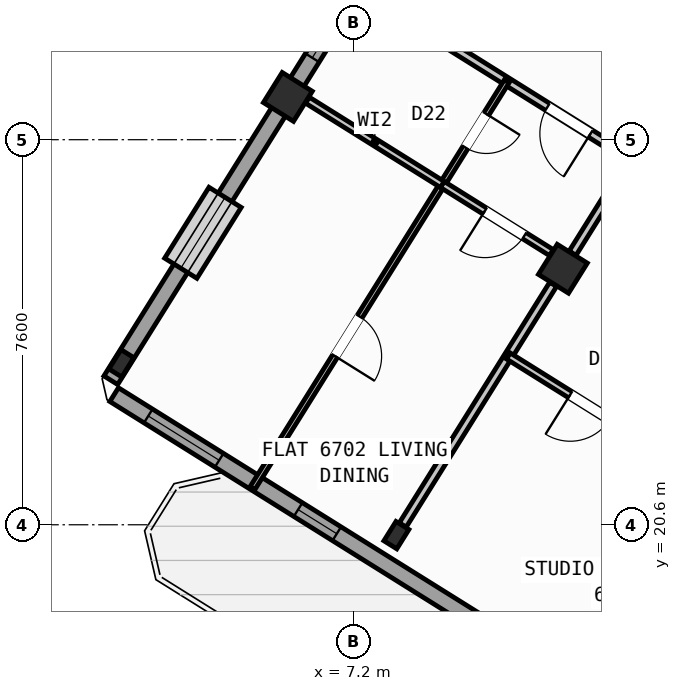
"""IFC4 building model, lengths in metres.
Left out: names, types, materials, properties, quantities, classifications, styles, units other than length and angle.
Written with IfcOpenShell. Run it as: python <this file> out.ifc"""

import sys

from ifc_helpers import new_model, si_unit, direction, frame, frame_2d, origin, origin_2d, place, context, subcontext, project, spatial, rectangle, hollow_rectangle, i_section, extrude, source, transform, mapped, element, fill, save


model = new_model("IFC4")
c1 = context("Model", 3, precision=1e-05, world=origin(), true_north=direction((0.0, 1.0)))
c2 = subcontext(c1, "Body", "Model", "MODEL_VIEW")
j1 = project(units=[si_unit("LENGTHUNIT", "METRE"), si_unit("PLANEANGLEUNIT", "RADIAN")], contexts=[c1])
p1 = place(None, origin())
s1 = spatial("IfcSite", under=j1, at=p1, CompositionType="ELEMENT")
p2 = place(p1, origin())
s2 = spatial("IfcBuilding", under=s1, at=p2, CompositionType="ELEMENT")
p3 = place(p2, frame((0.0, 0.0, 266.4)))
s3 = spatial("IfcBuildingStorey", under=s2, at=p3, CompositionType="ELEMENT", Elevation=266.4)
m1 = source(origin(), c2, "Body", "SweptSolid", [
    extrude(hollow_rectangle(XDim=0.7, YDim=0.7, WallThickness=0.028, at=origin_2d()), origin(), (0.0, 0.0, 1.0), 3.6),
])
p4 = place(p3, frame((11.336, 25.653, 0.0), z_axis=(0.0, 0.0, 1.0), x_axis=(-0.848048096156, 0.529919264233, 0.0)))
e1 = element("IfcColumn", 1, at=p4, inside=s3, PredefinedType="COLUMN", context=c2, shape_type="MappedRepresentation", body=[
    mapped(m1, transform((0.0, 0.0, 0.0), scale=1.0)),
])
m2 = source(origin(), c2, "Body", "SweptSolid", [
    extrude(i_section(OverallWidth=0.3, OverallDepth=0.45, WebThickness=0.014, FlangeThickness=0.026, at=origin_2d()), origin(), (0.0, 0.0, 1.0), 3.6),
])
p5 = place(p3, frame((8.051, 20.395, 0.0), z_axis=(0.0, 0.0, 1.0), x_axis=(-0.848048096156, 0.529919264233, 0.0)))
e2 = element("IfcColumn", 2, at=p5, inside=s3, PredefinedType="COLUMN", context=c2, shape_type="MappedRepresentation", body=[
    mapped(m2, transform((0.0, 0.0, 0.0), scale=1.0)),
])
p6 = place(p3, frame((5.909, 29.044, 0.0), z_axis=(0.0, 0.0, 1.0), x_axis=(-0.848048096156, 0.529919264233, 0.0)))
e3 = element("IfcColumn", 3, at=p6, inside=s3, PredefinedType="COLUMN", context=c2, shape_type="MappedRepresentation", body=[
    mapped(m1, transform((0.0, 0.0, 0.0), scale=1.0)),
])
p7 = place(p3, frame((2.623, 23.786, 0.0), z_axis=(0.0, 0.0, 1.0), x_axis=(-0.848048096156, 0.529919264233, 0.0)))
e4 = element("IfcColumn", 4, at=p7, inside=s3, PredefinedType="COLUMN", context=c2, shape_type="MappedRepresentation", body=[
    mapped(m2, transform((0.0, 0.0, 0.0), scale=1.0)),
])
p8 = place(p3, frame((29.268, 6.429, 0.0), z_axis=(0.0, 0.0, 1.0), x_axis=(-0.848049971435, 0.529916263149, 0.0)))
e5 = element("IfcWall", 5, at=p8, inside=s3, PredefinedType="STANDARD", context=c2, shape_type="SweptSolid", body=[
    extrude(rectangle(XDim=31.588, YDim=0.32, at=frame_2d((15.794, 0.0))), origin(), (0.0, 0.0, 1.0), 3.35),
])
p9 = place(p8, frame((16.362, 0.0, 0.0)))
e6 = element("IfcOpeningElement", 6, at=p9, cuts=e5, PredefinedType="OPENING", context=c2, shape_type="SweptSolid", body=[
    extrude(rectangle(XDim=1.2, YDim=2.15, at=frame_2d((0.6, 1.075))), frame((0.0, 0.17, 0.0), z_axis=(0.0, -1.0, 0.0), x_axis=(1.0, 0.0, 0.0)), (0.0, 0.0, 1.0), 0.34),
])
p10 = place(p8, frame((3.859, 0.0, 0.9)))
e7 = element("IfcOpeningElement", 7, at=p10, cuts=e5, PredefinedType="OPENING", context=c2, shape_type="SweptSolid", body=[
    extrude(rectangle(XDim=1.65, YDim=1.45, at=frame_2d((0.825, 0.725))), frame((0.0, 0.17, 0.0), z_axis=(0.0, -1.0, 0.0), x_axis=(1.0, 0.0, 0.0)), (0.0, 0.0, 1.0), 0.34),
])
p11 = place(p8, frame((10.519, 0.0, 0.9)))
e8 = element("IfcOpeningElement", 8, at=p11, cuts=e5, PredefinedType="OPENING", context=c2, shape_type="SweptSolid", body=[
    extrude(rectangle(XDim=1.65, YDim=1.45, at=frame_2d((0.825, 0.725))), frame((0.0, 0.17, 0.0), z_axis=(0.0, -1.0, 0.0), x_axis=(1.0, 0.0, 0.0)), (0.0, 0.0, 1.0), 0.34),
])
p12 = place(p8, frame((21.219, 0.0, 0.95)))
e9 = element("IfcOpeningElement", 9, at=p12, cuts=e5, PredefinedType="OPENING", context=c2, shape_type="SweptSolid", body=[
    extrude(rectangle(XDim=1.95, YDim=1.35, at=frame_2d((0.975, 0.675))), frame((0.0, 0.17, 0.0), z_axis=(0.0, -1.0, 0.0), x_axis=(1.0, 0.0, 0.0)), (0.0, 0.0, 1.0), 0.34),
])
p13 = place(p8, frame((26.406, 0.0, 1.0)))
e10 = element("IfcOpeningElement", 10, at=p13, cuts=e5, PredefinedType="OPENING", context=c2, shape_type="SweptSolid", body=[
    extrude(rectangle(XDim=0.9, YDim=1.25, at=frame_2d((0.45, 0.625))), frame((0.0, 0.17, 0.0), z_axis=(0.0, -1.0, 0.0), x_axis=(1.0, 0.0, 0.0)), (0.0, 0.0, 1.0), 0.34),
])
p14 = place(p8, frame((29.143, 0.0, 0.9)))
e11 = element("IfcOpeningElement", 11, at=p14, cuts=e5, PredefinedType="OPENING", context=c2, shape_type="SweptSolid", body=[
    extrude(rectangle(XDim=1.65, YDim=1.45, at=frame_2d((0.825, 0.725))), frame((0.0, 0.17, 0.0), z_axis=(0.0, -1.0, 0.0), x_axis=(1.0, 0.0, 0.0)), (0.0, 0.0, 1.0), 0.34),
])
p15 = place(p3, frame((2.415, 23.452, 0.0), z_axis=(0.0, 0.0, 1.0), x_axis=(0.52991049553, 0.848053575387, 0.0)))
e12 = element("IfcWall", 12, at=p15, inside=s3, PredefinedType="STANDARD", context=c2, shape_type="SweptSolid", body=[
    extrude(rectangle(XDim=21.587, YDim=0.32, at=frame_2d((10.794, 0.0))), origin(), (0.0, 0.0, 1.0), 2.875),
])
p16 = place(p15, frame((2.606, 0.0, 0.9)))
e13 = element("IfcOpeningElement", 13, at=p16, cuts=e12, PredefinedType="OPENING", context=c2, shape_type="SweptSolid", body=[
    extrude(rectangle(XDim=1.65, YDim=1.45, at=frame_2d((0.825, 0.725))), frame((0.0, 0.17, 0.0), z_axis=(0.0, -1.0, 0.0), x_axis=(1.0, 0.0, 0.0)), (0.0, 0.0, 1.0), 0.34),
])
p17 = place(p15, frame((7.504, 0.0, 1.0)))
e14 = element("IfcOpeningElement", 14, at=p17, cuts=e12, PredefinedType="OPENING", context=c2, shape_type="SweptSolid", body=[
    extrude(rectangle(XDim=0.9, YDim=1.25, at=frame_2d((0.45, 0.625))), frame((0.0, 0.17, 0.0), z_axis=(0.0, -1.0, 0.0), x_axis=(1.0, 0.0, 0.0)), (0.0, 0.0, 1.0), 0.34),
])
p18 = place(p15, frame((12.084, 0.0, 1.0)))
e15 = element("IfcOpeningElement", 15, at=p18, cuts=e12, PredefinedType="OPENING", context=c2, shape_type="SweptSolid", body=[
    extrude(rectangle(XDim=0.9, YDim=1.25, at=frame_2d((0.45, 0.625))), frame((0.0, 0.17, 0.0), z_axis=(0.0, -1.0, 0.0), x_axis=(1.0, 0.0, 0.0)), (0.0, 0.0, 1.0), 0.34),
])
p19 = place(p15, frame((15.619, 0.0, 1.0)))
e16 = element("IfcOpeningElement", 16, at=p19, cuts=e12, PredefinedType="OPENING", context=c2, shape_type="SweptSolid", body=[
    extrude(rectangle(XDim=0.9, YDim=1.25, at=frame_2d((0.45, 0.625))), frame((0.0, 0.17, 0.0), z_axis=(0.0, -1.0, 0.0), x_axis=(1.0, 0.0, 0.0)), (0.0, 0.0, 1.0), 0.34),
])
p20 = place(p15, frame((18.569, 0.0, 1.0)))
e17 = element("IfcOpeningElement", 17, at=p20, cuts=e12, PredefinedType="OPENING", context=c2, shape_type="SweptSolid", body=[
    extrude(rectangle(XDim=0.9, YDim=1.25, at=frame_2d((0.45, 0.625))), frame((0.0, 0.17, 0.0), z_axis=(0.0, -1.0, 0.0), x_axis=(1.0, 0.0, 0.0)), (0.0, 0.0, 1.0), 0.34),
])
p21 = place(p3, frame((22.495, 24.281, 0.0), z_axis=(0.0, 0.0, 1.0), x_axis=(-0.848052408131, 0.529912363569, 0.0)))
e18 = element("IfcWall", 18, at=p21, inside=s3, PredefinedType="PARTITIONING", context=c2, shape_type="SweptSolid", body=[
    extrude(rectangle(XDim=16.73, YDim=0.16, at=frame_2d((8.365, 0.0))), origin(), (0.0, 0.0, 1.0), 3.34),
])
p22 = place(p21, frame((2.22, 0.0, 0.0)))
e19 = element("IfcOpeningElement", 19, at=p22, cuts=e18, PredefinedType="OPENING", context=c2, shape_type="SweptSolid", body=[
    extrude(rectangle(XDim=0.86, YDim=2.05, at=frame_2d((0.43, 1.025))), frame((0.0, 0.09, 0.0), z_axis=(0.0, -1.0, 0.0), x_axis=(1.0, 0.0, 0.0)), (0.0, 0.0, 1.0), 0.18),
])
p23 = place(p21, frame((6.49, 0.0, 0.0)))
e20 = element("IfcOpeningElement", 20, at=p23, cuts=e18, PredefinedType="OPENING", context=c2, shape_type="SweptSolid", body=[
    extrude(rectangle(XDim=1.0, YDim=2.1, at=frame_2d((0.5, 1.05))), frame((0.0, 0.09, 0.0), z_axis=(0.0, -1.0, 0.0), x_axis=(1.0, 0.0, 0.0)), (0.0, 0.0, 1.0), 0.18),
])
p24 = place(p21, frame((14.76, 0.0, 0.0)))
e21 = element("IfcOpeningElement", 21, at=p24, cuts=e18, PredefinedType="OPENING", context=c2, shape_type="SweptSolid", body=[
    extrude(rectangle(XDim=1.0, YDim=2.1, at=frame_2d((0.5, 1.05))), frame((0.0, 0.09, 0.0), z_axis=(0.0, -1.0, 0.0), x_axis=(1.0, 0.0, 0.0)), (0.0, 0.0, 1.0), 0.18),
])
p25 = place(p3, frame((21.329, 22.416, 0.0), z_axis=(0.0, 0.0, 1.0), x_axis=(-0.848052408131, 0.529912363569, 0.0)))
e22 = element("IfcWall", 22, at=p25, inside=s3, PredefinedType="PARTITIONING", context=c2, shape_type="SweptSolid", body=[
    extrude(rectangle(XDim=16.73, YDim=0.16, at=frame_2d((8.365, 0.0))), origin(), (0.0, 0.0, 1.0), 3.34),
])
p26 = place(p25, frame((1.395, 0.0, 0.0)))
e23 = element("IfcOpeningElement", 23, at=p26, cuts=e22, PredefinedType="OPENING", context=c2, shape_type="SweptSolid", body=[
    extrude(rectangle(XDim=1.0, YDim=2.1, at=frame_2d((0.5, 1.05))), frame((0.0, 0.09, 0.0), z_axis=(0.0, -1.0, 0.0), x_axis=(1.0, 0.0, 0.0)), (0.0, 0.0, 1.0), 0.18),
])
p27 = place(p25, frame((7.82, 0.0, 0.0)))
e24 = element("IfcOpeningElement", 24, at=p27, cuts=e22, PredefinedType="OPENING", context=c2, shape_type="SweptSolid", body=[
    extrude(rectangle(XDim=1.0, YDim=2.1, at=frame_2d((0.5, 1.05))), frame((0.0, 0.09, 0.0), z_axis=(0.0, -1.0, 0.0), x_axis=(1.0, 0.0, 0.0)), (0.0, 0.0, 1.0), 0.18),
])
p28 = place(p25, frame((11.14, 0.0, 0.0)))
e25 = element("IfcOpeningElement", 25, at=p28, cuts=e22, PredefinedType="OPENING", context=c2, shape_type="SweptSolid", body=[
    extrude(rectangle(XDim=1.0, YDim=2.1, at=frame_2d((0.5, 1.05))), frame((0.0, 0.09, 0.0), z_axis=(0.0, -1.0, 0.0), x_axis=(1.0, 0.0, 0.0)), (0.0, 0.0, 1.0), 0.18),
])
p29 = place(p3, frame((12.688, 27.815, 0.0), z_axis=(0.0, 0.0, 1.0), x_axis=(-0.52994879608, -0.848029641896, 0.0)))
e26 = element("IfcWall", 26, at=p29, inside=s3, PredefinedType="PARTITIONING", context=c2, shape_type="SweptSolid", body=[
    extrude(rectangle(XDim=2.188, YDim=0.16, at=frame_2d((1.094, 0.0))), origin(), (0.0, 0.0, 1.0), 2.875),
])
p30 = place(p3, frame((11.144, 25.346, 0.0), z_axis=(0.0, 0.0, 1.0), x_axis=(-0.529904903214, -0.848057069748, 0.0)))
e27 = element("IfcWall", 27, at=p30, inside=s3, PredefinedType="PARTITIONING", context=c2, shape_type="SweptSolid", body=[
    extrude(rectangle(XDim=5.601, YDim=0.16, at=frame_2d((2.801, 0.0))), origin(), (0.0, 0.0, 1.0), 2.875),
])
p31 = place(p3, frame((15.688, 20.54, 0.0), z_axis=(0.0, 0.0, 1.0), x_axis=(-0.848049732085, 0.529916646191, 0.0)))
e28 = element("IfcWall", 28, at=p31, inside=s3, PredefinedType="PLUMBINGWALL", context=c2, shape_type="SweptSolid", body=[
    extrude(rectangle(XDim=6.4, YDim=0.14, at=frame_2d((3.2, 0.0))), origin(), (0.0, 0.0, 1.0), 3.34),
])
p32 = place(p31, frame((4.04, 0.0, 0.0)))
e29 = element("IfcOpeningElement", 29, at=p32, cuts=e28, PredefinedType="OPENING", context=c2, shape_type="SweptSolid", body=[
    extrude(rectangle(XDim=0.92, YDim=2.08, at=frame_2d((0.46, 1.04))), frame((0.0, 0.08, 0.0), z_axis=(0.0, -1.0, 0.0), x_axis=(1.0, 0.0, 0.0)), (0.0, 0.0, 1.0), 0.16),
])
p33 = place(p3, frame((10.228, 29.352, 0.0), z_axis=(0.0, 0.0, 1.0), x_axis=(-0.529917830441, -0.848048992088, 0.0)))
e30 = element("IfcWall", 30, at=p33, inside=s3, PredefinedType="PARTITIONING", context=c2, shape_type="SweptSolid", body=[
    extrude(rectangle(XDim=9.47, YDim=0.11, at=frame_2d((4.735, 0.0))), origin(), (0.0, 0.0, 1.0), 3.34),
])
p34 = place(p33, frame((0.76, 0.0, 0.0)))
e31 = element("IfcOpeningElement", 31, at=p34, cuts=e30, PredefinedType="OPENING", context=c2, shape_type="SweptSolid", body=[
    extrude(rectangle(XDim=0.78, YDim=2.05, at=frame_2d((0.39, 1.025))), frame((0.0, 0.065, 0.0), z_axis=(0.0, -1.0, 0.0), x_axis=(1.0, 0.0, 0.0)), (0.0, 0.0, 1.0), 0.13),
])
p35 = place(p33, frame((5.475, 0.0, 0.0)))
e32 = element("IfcOpeningElement", 32, at=p35, cuts=e30, PredefinedType="OPENING", context=c2, shape_type="SweptSolid", body=[
    extrude(rectangle(XDim=0.92, YDim=2.08, at=frame_2d((0.46, 1.04))), frame((0.0, 0.065, 0.0), z_axis=(0.0, -1.0, 0.0), x_axis=(1.0, 0.0, 0.0)), (0.0, 0.0, 1.0), 0.13),
])
p36 = place(p3, frame((11.109, 25.972, 0.0), z_axis=(0.0, 0.0, 1.0), x_axis=(-0.848041534199, 0.529929765415, 0.0)))
e33 = element("IfcWall", 33, at=p36, inside=s3, PredefinedType="PLUMBINGWALL", context=c2, shape_type="SweptSolid", body=[
    extrude(rectangle(XDim=2.538, YDim=0.14, at=frame_2d((1.269, 0.0))), origin(), (0.0, 0.0, 1.0), 2.875),
])
p37 = place(p36, frame((0.628, 0.0, 0.0)))
e34 = element("IfcOpeningElement", 34, at=p37, cuts=e33, PredefinedType="OPENING", context=c2, shape_type="SweptSolid", body=[
    extrude(rectangle(XDim=0.92, YDim=2.08, at=frame_2d((0.46, 1.04))), frame((0.0, 0.08, 0.0), z_axis=(0.0, -1.0, 0.0), x_axis=(1.0, 0.0, 0.0)), (0.0, 0.0, 1.0), 0.16),
])
p38 = place(p3, frame((8.956, 27.317, 0.0), z_axis=(0.0, 0.0, 1.0), x_axis=(-0.848050751193, 0.529915015264, 0.0)))
e35 = element("IfcWall", 35, at=p38, inside=s3, PredefinedType="PLUMBINGWALL", context=c2, shape_type="SweptSolid", body=[
    extrude(rectangle(XDim=3.138, YDim=0.14, at=frame_2d((1.569, 0.0))), origin(), (0.0, 0.0, 1.0), 2.875),
])
m3 = source(origin(), c2, "Body", "SweptSolid", [
    extrude(rectangle(XDim=0.9, YDim=1.25, at=frame_2d((0.45, 0.625))), frame((0.0, 0.03, 0.0), z_axis=(0.0, -1.0, 0.0), x_axis=(1.0, 0.0, 0.0)), (0.0, 0.0, 1.0), 0.06),
])
p39 = place(p13, origin())
e36 = element("IfcWindow", 36, at=p39, inside=s3, PartitioningType="SINGLE_PANEL", PredefinedType="WINDOW", context=c2, shape_type="MappedRepresentation", body=[
    mapped(m3, transform((0.0, 0.0, 0.0), scale=1.0)),
])
fill(e10, e36)
m4 = source(origin(), c2, "Body", "SweptSolid", [
    extrude(rectangle(XDim=1.65, YDim=1.45, at=frame_2d((0.825, 0.725))), frame((0.0, 0.03, 0.0), z_axis=(0.0, -1.0, 0.0), x_axis=(1.0, 0.0, 0.0)), (0.0, 0.0, 1.0), 0.06),
])
p40 = place(p14, origin())
e37 = element("IfcWindow", 37, at=p40, inside=s3, PartitioningType="SINGLE_PANEL", PredefinedType="WINDOW", context=c2, shape_type="MappedRepresentation", body=[
    mapped(m4, transform((0.0, 0.0, 0.0), scale=1.0)),
])
fill(e11, e37)
p41 = place(p16, origin())
e38 = element("IfcWindow", 38, at=p41, inside=s3, PartitioningType="SINGLE_PANEL", PredefinedType="WINDOW", context=c2, shape_type="MappedRepresentation", body=[
    mapped(m4, transform((0.0, 0.0, 0.0), scale=1.0)),
])
fill(e13, e38)
p42 = place(p17, origin())
e39 = element("IfcWindow", 39, at=p42, inside=s3, PartitioningType="SINGLE_PANEL", PredefinedType="WINDOW", context=c2, shape_type="MappedRepresentation", body=[
    mapped(m3, transform((0.0, 0.0, 0.0), scale=1.0)),
])
fill(e14, e39)
m5 = source(origin(), c2, "Body", "SweptSolid", [
    extrude(rectangle(XDim=0.92, YDim=2.08, at=frame_2d((0.46, 1.04))), frame((0.0, 0.025, 0.0), z_axis=(0.0, -1.0, 0.0), x_axis=(1.0, 0.0, 0.0)), (0.0, 0.0, 1.0), 0.05),
])
p43 = place(p32, origin())
e40 = element("IfcDoor", 40, at=p43, inside=s3, OperationType="SINGLE_SWING_RIGHT", PredefinedType="DOOR", context=c2, shape_type="MappedRepresentation", body=[
    mapped(m5, transform((0.0, 0.0, 0.0), scale=1.0)),
])
fill(e29, e40)
m6 = source(origin(), c2, "Body", "SweptSolid", [
    extrude(rectangle(XDim=1.0, YDim=2.1, at=frame_2d((0.5, 1.05))), frame((0.0, 0.025, 0.0), z_axis=(0.0, -1.0, 0.0), x_axis=(1.0, 0.0, 0.0)), (0.0, 0.0, 1.0), 0.05),
])
p44 = place(p28, origin())
e41 = element("IfcDoor", 41, at=p44, inside=s3, OperationType="SINGLE_SWING_LEFT", PredefinedType="DOOR", context=c2, shape_type="MappedRepresentation", body=[
    mapped(m6, transform((0.0, 0.0, 0.0), scale=1.0)),
])
fill(e25, e41)
p45 = place(p37, origin())
e42 = element("IfcDoor", 42, at=p45, inside=s3, OperationType="SINGLE_SWING_RIGHT", PredefinedType="DOOR", context=c2, shape_type="MappedRepresentation", body=[
    mapped(m5, transform((0.0, 0.0, 0.0), scale=1.0)),
])
fill(e34, e42)
m7 = source(origin(), c2, "Body", "SweptSolid", [
    extrude(rectangle(XDim=0.78, YDim=2.05, at=frame_2d((0.39, 1.025))), frame((0.0, 0.025, 0.0), z_axis=(0.0, -1.0, 0.0), x_axis=(1.0, 0.0, 0.0)), (0.0, 0.0, 1.0), 0.05),
])
p46 = place(p34, origin())
e43 = element("IfcDoor", 43, at=p46, inside=s3, OperationType="SINGLE_SWING_LEFT", PredefinedType="DOOR", context=c2, shape_type="MappedRepresentation", body=[
    mapped(m7, transform((0.0, 0.0, 0.0), scale=1.0)),
])
fill(e31, e43)
p47 = place(p35, origin())
e44 = element("IfcDoor", 44, at=p47, inside=s3, OperationType="SINGLE_SWING_RIGHT", PredefinedType="DOOR", context=c2, shape_type="MappedRepresentation", body=[
    mapped(m5, transform((0.0, 0.0, 0.0), scale=1.0)),
])
fill(e32, e44)
save(model, sys.argv[1])
